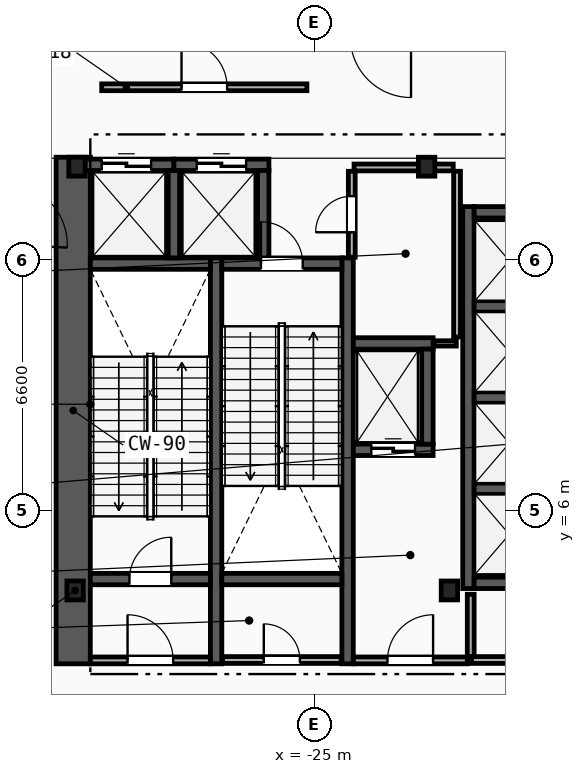
"""IFC4 building model, lengths in metres.
Left out: names, types, materials, properties, quantities, classifications, styles, units other than length and angle.
Written with IfcOpenShell. Run it as: python <this file> out.ifc"""

import sys

from ifc_helpers import new_model, si_unit, direction, frame, frame_2d, origin, origin_2d, place, context, subcontext, project, spatial, rectangle, i_section, extrude, element, fill, save


model = new_model("IFC4")
c1 = context("Model", 3, precision=1e-05, world=origin(), true_north=direction((0.0, 1.0)))
c2 = subcontext(c1, "Body", "Model", "MODEL_VIEW")
j1 = project(units=[si_unit("LENGTHUNIT", "METRE"), si_unit("PLANEANGLEUNIT", "RADIAN")], contexts=[c1])
p1 = place(None, origin())
s1 = spatial("IfcSite", under=j1, at=p1, CompositionType="ELEMENT")
p2 = place(p1, origin())
s2 = spatial("IfcBuilding", under=s1, at=p2, CompositionType="ELEMENT")
p3 = place(p2, origin())
s3 = spatial("IfcBuildingStorey", under=s2, at=p3, CompositionType="ELEMENT", Elevation=0.0)
for number, where, z_axis, x_axis in (
    (1, (-31.3, 3.9, 0.0), (0.0, 0.0, 1.0), (1.0, 0.0, 0.0)),
    (2, (-21.45, 3.9, 0.0), (0.0, 0.0, 1.0), (1.0, 0.0, 0.0)),
    (3, (-22.05, 15.05, 0.0), (0.0, 0.0, 1.0), (1.0, 0.0, 0.0)),
    (4, (-31.25, 15.05, 0.0), (0.0, 0.0, 1.0), (1.0, 0.0, 0.0)),
):
    element("IfcColumn", number, at=place(p3, frame(where, z_axis=z_axis, x_axis=x_axis)), inside=s3, PredefinedType="COLUMN", context=c2, shape_type="SweptSolid", body=[
        extrude(i_section(OverallWidth=0.432, OverallDepth=0.498, WebThickness=0.056, FlangeThickness=0.089, FilletRadius=0.018, at=origin_2d()), origin(), (0.0, 0.0, 1.0), 6.0),
    ])
p4 = place(p3, frame((-31.35, 1.97, 0.0), z_axis=(0.0, 0.0, 1.0), x_axis=(0.0, 1.0, 0.0)))
e5 = element("IfcWall", 5, at=p4, inside=s3, PredefinedType="SHEAR", context=c2, shape_type="SweptSolid", body=[
    extrude(rectangle(XDim=13.33, YDim=0.9, at=frame_2d((6.665, 0.0))), origin(), (0.0, 0.0, 1.0), 5.65),
])
for number, where, z_axis, x_axis in (
    (6, (-27.59, 1.97, 0.0), (0.0, 0.0, 1.0), (0.0, 1.0, 0.0)),
    (7, (-24.13, 1.97, 0.0), (0.0, 0.0, 1.0), (0.0, 1.0, 0.0)),
):
    element("IfcWall", number, at=place(p3, frame(where, z_axis=z_axis, x_axis=x_axis)), inside=s3, PredefinedType="SHEAR", context=c2, shape_type="SweptSolid", body=[
        extrude(rectangle(XDim=10.68, YDim=0.3, at=frame_2d((5.34, 0.0))), origin(), (0.0, 0.0, 1.0), 5.65),
    ])
p5 = place(p3, frame((-30.9, 4.2, 0.0), z_axis=(0.0, 0.0, 1.0), x_axis=(1.0, 0.0, 0.0)))
e8 = element("IfcWall", 8, at=p5, inside=s3, PredefinedType="SHEAR", context=c2, shape_type="SweptSolid", body=[
    extrude(rectangle(XDim=3.16, YDim=0.3, at=frame_2d((1.58, 0.0))), origin(), (0.0, 0.0, 1.0), 5.65),
])
p6 = place(p5, frame((1.03, 0.0, 0.0)))
e9 = element("IfcOpeningElement", 9, at=p6, cuts=e8, PredefinedType="OPENING", context=c2, shape_type="SweptSolid", body=[
    extrude(rectangle(XDim=1.1, YDim=2.15, at=frame_2d((0.55, 1.075))), frame((0.0, 0.16, 0.0), z_axis=(0.0, -1.0, 0.0), x_axis=(1.0, 0.0, 0.0)), (0.0, 0.0, 1.0), 0.32),
])
p7 = place(p3, frame((-30.9, 12.5, 0.0), z_axis=(0.0, 0.0, 1.0), x_axis=(1.0, 0.0, 0.0)))
e10 = element("IfcWall", 10, at=p7, inside=s3, PredefinedType="SHEAR", context=c2, shape_type="SweptSolid", body=[
    extrude(rectangle(XDim=3.16, YDim=0.3, at=frame_2d((1.58, 0.0))), origin(), (0.0, 0.0, 1.0), 5.65),
])
p8 = place(p3, frame((-27.44, 12.5, 0.0), z_axis=(0.0, 0.0, 1.0), x_axis=(1.0, 0.0, 0.0)))
e11 = element("IfcWall", 11, at=p8, inside=s3, PredefinedType="SHEAR", context=c2, shape_type="SweptSolid", body=[
    extrude(rectangle(XDim=3.16, YDim=0.3, at=frame_2d((1.58, 0.0))), origin(), (0.0, 0.0, 1.0), 5.65),
])
p9 = place(p8, frame((1.03, 0.0, 0.0)))
e12 = element("IfcOpeningElement", 12, at=p9, cuts=e11, PredefinedType="OPENING", context=c2, shape_type="SweptSolid", body=[
    extrude(rectangle(XDim=1.1, YDim=2.15, at=frame_2d((0.55, 1.075))), frame((0.0, 0.16, 0.0), z_axis=(0.0, -1.0, 0.0), x_axis=(1.0, 0.0, 0.0)), (0.0, 0.0, 1.0), 0.32),
])
p10 = place(p3, frame((-27.44, 4.2, 0.0), z_axis=(0.0, 0.0, 1.0), x_axis=(1.0, 0.0, 0.0)))
e13 = element("IfcWall", 13, at=p10, inside=s3, PredefinedType="SHEAR", context=c2, shape_type="SweptSolid", body=[
    extrude(rectangle(XDim=3.16, YDim=0.3, at=frame_2d((1.58, 0.0))), origin(), (0.0, 0.0, 1.0), 5.65),
])
p11 = place(p3, frame((-20.89, 2.15, 0.0), z_axis=(0.0, 0.0, 1.0), x_axis=(0.0, 1.0, 0.0)))
e14 = element("IfcWall", 14, at=p11, inside=s3, PredefinedType="PARTITIONING", context=c2, shape_type="SweptSolid", body=[
    extrude(rectangle(XDim=1.65, YDim=0.18, at=frame_2d((0.825, 0.0))), origin(), (0.0, 0.0, 1.0), 5.65),
])
p12 = place(p3, frame((-23.98, 2.06, 0.0), z_axis=(0.0, 0.0, 1.0), x_axis=(1.0, 0.0, 0.0)))
e15 = element("IfcWall", 15, at=p12, inside=s3, PredefinedType="PARTITIONING", context=c2, shape_type="SweptSolid", body=[
    extrude(rectangle(XDim=3.0, YDim=0.18, at=frame_2d((1.5, 0.0))), origin(), (0.0, 0.0, 1.0), 5.65),
])
p13 = place(p12, frame((0.9, 0.0, 0.0)))
e16 = element("IfcOpeningElement", 16, at=p13, cuts=e15, PredefinedType="OPENING", context=c2, shape_type="SweptSolid", body=[
    extrude(rectangle(XDim=1.2, YDim=2.15, at=frame_2d((0.6, 1.075))), frame((0.0, 0.1, 0.0), z_axis=(0.0, -1.0, 0.0), x_axis=(1.0, 0.0, 0.0)), (0.0, 0.0, 1.0), 0.2),
])
p14 = place(p3, frame((-30.9, 2.06, 0.0), z_axis=(0.0, 0.0, 1.0), x_axis=(1.0, 0.0, 0.0)))
e17 = element("IfcWall", 17, at=p14, inside=s3, PredefinedType="PARTITIONING", context=c2, shape_type="SweptSolid", body=[
    extrude(rectangle(XDim=3.16, YDim=0.18, at=frame_2d((1.58, 0.0))), origin(), (0.0, 0.0, 1.0), 5.65),
])
p15 = place(p14, frame((0.98, 0.0, 0.0)))
e18 = element("IfcOpeningElement", 18, at=p15, cuts=e17, PredefinedType="OPENING", context=c2, shape_type="SweptSolid", body=[
    extrude(rectangle(XDim=1.2, YDim=2.15, at=frame_2d((0.6, 1.075))), frame((0.0, 0.1, 0.0), z_axis=(0.0, -1.0, 0.0), x_axis=(1.0, 0.0, 0.0)), (0.0, 0.0, 1.0), 0.2),
])
p16 = place(p3, frame((-30.6, 17.14, 0.0), z_axis=(0.0, 0.0, 1.0), x_axis=(1.0, 0.0, 0.0)))
e19 = element("IfcWall", 19, at=p16, inside=s3, PredefinedType="PARTITIONING", context=c2, shape_type="SweptSolid", body=[
    extrude(rectangle(XDim=5.4, YDim=0.18, at=frame_2d((2.7, 0.0))), origin(), (0.0, 0.0, 1.0), 5.65),
])
p17 = place(p16, frame((2.1, 0.0, 0.0)))
e20 = element("IfcOpeningElement", 20, at=p17, cuts=e19, PredefinedType="OPENING", context=c2, shape_type="SweptSolid", body=[
    extrude(rectangle(XDim=1.2, YDim=2.15, at=frame_2d((0.6, 1.075))), frame((0.0, 0.1, 0.0), z_axis=(0.0, -1.0, 0.0), x_axis=(1.0, 0.0, 0.0)), (0.0, 0.0, 1.0), 0.2),
])
p18 = place(p3, frame((-23.98, 7.6, 0.0), z_axis=(0.0, 0.0, 1.0), x_axis=(1.0, 0.0, 0.0)))
e21 = element("IfcWall", 21, at=p18, inside=s3, PredefinedType="SHEAR", context=c2, shape_type="SweptSolid", body=[
    extrude(rectangle(XDim=2.1, YDim=0.3, at=frame_2d((1.05, 0.0))), origin(), (0.0, 0.0, 1.0), 5.65),
])
p19 = place(p18, frame((0.475, 0.0, 0.0)))
e22 = element("IfcOpeningElement", 22, at=p19, cuts=e21, PredefinedType="OPENING", context=c2, shape_type="SweptSolid", body=[
    extrude(rectangle(XDim=1.15, YDim=2.2, at=frame_2d((0.575, 1.1))), frame((0.0, 0.16, 0.0), z_axis=(0.0, -1.0, 0.0), x_axis=(1.0, 0.0, 0.0)), (0.0, 0.0, 1.0), 0.32),
])
p20 = place(p3, frame((-23.98, 10.4, 0.0), z_axis=(0.0, 0.0, 1.0), x_axis=(1.0, 0.0, 0.0)))
e23 = element("IfcWall", 23, at=p20, inside=s3, PredefinedType="SHEAR", context=c2, shape_type="SweptSolid", body=[
    extrude(rectangle(XDim=2.1, YDim=0.3, at=frame_2d((1.05, 0.0))), origin(), (0.0, 0.0, 1.0), 5.65),
])
p21 = place(p3, frame((-22.03, 7.75, 0.0), z_axis=(0.0, 0.0, 1.0), x_axis=(0.0, 1.0, 0.0)))
e24 = element("IfcWall", 24, at=p21, inside=s3, PredefinedType="SHEAR", context=c2, shape_type="SweptSolid", body=[
    extrude(rectangle(XDim=2.5, YDim=0.3, at=frame_2d((1.25, 0.0))), origin(), (0.0, 0.0, 1.0), 5.65),
])
p22 = place(p3, frame((-31.2, 15.1, 0.0), z_axis=(0.0, 0.0, 1.0), x_axis=(1.0, 0.0, 0.0)))
e25 = element("IfcWall", 25, at=p22, inside=s3, PredefinedType="SHEAR", context=c2, shape_type="SweptSolid", body=[
    extrude(rectangle(XDim=2.5, YDim=0.3, at=frame_2d((1.25, 0.0))), origin(), (0.0, 0.0, 1.0), 5.65),
])
p23 = place(p22, frame((0.6, 0.0, 0.0)))
e26 = element("IfcOpeningElement", 26, at=p23, cuts=e25, PredefinedType="OPENING", context=c2, shape_type="SweptSolid", body=[
    extrude(rectangle(XDim=1.3, YDim=2.2, at=frame_2d((0.65, 1.1))), frame((0.0, 0.16, 0.0), z_axis=(0.0, -1.0, 0.0), x_axis=(1.0, 0.0, 0.0)), (0.0, 0.0, 1.0), 0.32),
])
p24 = place(p3, frame((-28.7, 12.65, 0.0), z_axis=(0.0, 0.0, 1.0), x_axis=(0.0, 1.0, 0.0)))
e27 = element("IfcWall", 27, at=p24, inside=s3, PredefinedType="SHEAR", context=c2, shape_type="SweptSolid", body=[
    extrude(rectangle(XDim=2.3, YDim=0.3, at=frame_2d((1.15, 0.0))), origin(), (0.0, 0.0, 1.0), 5.65),
])
p25 = place(p3, frame((-28.7, 15.1, 0.0), z_axis=(0.0, 0.0, 1.0), x_axis=(1.0, 0.0, 0.0)))
e28 = element("IfcWall", 28, at=p25, inside=s3, PredefinedType="SHEAR", context=c2, shape_type="SweptSolid", body=[
    extrude(rectangle(XDim=2.5, YDim=0.3, at=frame_2d((1.25, 0.0))), origin(), (0.0, 0.0, 1.0), 5.65),
])
p26 = place(p25, frame((0.6, 0.0, 0.0)))
e29 = element("IfcOpeningElement", 29, at=p26, cuts=e28, PredefinedType="OPENING", context=c2, shape_type="SweptSolid", body=[
    extrude(rectangle(XDim=1.3, YDim=2.2, at=frame_2d((0.65, 1.1))), frame((0.0, 0.16, 0.0), z_axis=(0.0, -1.0, 0.0), x_axis=(1.0, 0.0, 0.0)), (0.0, 0.0, 1.0), 0.32),
])
p27 = place(p3, frame((-26.35, 12.65, 0.0), z_axis=(0.0, 0.0, 1.0), x_axis=(0.0, 1.0, 0.0)))
e30 = element("IfcWall", 30, at=p27, inside=s3, PredefinedType="SHEAR", context=c2, shape_type="SweptSolid", body=[
    extrude(rectangle(XDim=2.3, YDim=0.3, at=frame_2d((1.15, 0.0))), origin(), (0.0, 0.0, 1.0), 5.65),
])
p28 = place(p3, frame((-20.95, 3.95, 0.0), z_axis=(0.0, 0.0, 1.0), x_axis=(0.0, 1.0, 0.0)))
e31 = element("IfcWall", 31, at=p28, inside=s3, PredefinedType="SHEAR", context=c2, shape_type="SweptSolid", body=[
    extrude(rectangle(XDim=10.05, YDim=0.3, at=frame_2d((5.025, 0.0))), origin(), (0.0, 0.0, 1.0), 5.65),
])
for number, where, z_axis, x_axis in (
    (32, (-20.8, 4.1, 0.0), (0.0, 0.0, 1.0), (1.0, 0.0, 0.0)),
    (33, (-20.8, 13.85, 0.0), (0.0, 0.0, 1.0), (1.0, 0.0, 0.0)),
):
    element("IfcWall", number, at=place(p3, frame(where, z_axis=z_axis, x_axis=x_axis)), inside=s3, PredefinedType="SHEAR", context=c2, shape_type="SweptSolid", body=[
        extrude(rectangle(XDim=2.15, YDim=0.3, at=frame_2d((1.075, 0.0))), origin(), (0.0, 0.0, 1.0), 5.65),
    ])
for number, where, z_axis, x_axis in (
    (34, (-20.8, 6.575, 0.0), (0.0, 0.0, 1.0), (1.0, 0.0, 0.0)),
    (35, (-20.8, 8.975, 0.0), (0.0, 0.0, 1.0), (1.0, 0.0, 0.0)),
    (36, (-20.8, 11.375, 0.0), (0.0, 0.0, 1.0), (1.0, 0.0, 0.0)),
):
    element("IfcWall", number, at=place(p3, frame(where, z_axis=z_axis, x_axis=x_axis)), inside=s3, PredefinedType="SHEAR", context=c2, shape_type="SweptSolid", body=[
        extrude(rectangle(XDim=1.85, YDim=0.3, at=frame_2d((0.925, 0.0))), origin(), (0.0, 0.0, 1.0), 5.65),
    ])
p29 = place(p3, frame((-20.87, 2.07, 0.0), z_axis=(0.0, 0.0, 1.0), x_axis=(1.0, 0.0, 0.0)))
e37 = element("IfcWall", 37, at=p29, inside=s3, PredefinedType="PARTITIONING", context=c2, shape_type="SweptSolid", body=[
    extrude(rectangle(XDim=3.83, YDim=0.18, at=frame_2d((1.915, 0.0))), origin(), (0.0, 0.0, 1.0), 5.65),
])
p30 = place(p29, frame((1.44, 0.0, 0.0)))
e38 = element("IfcOpeningElement", 38, at=p30, cuts=e37, PredefinedType="OPENING", context=c2, shape_type="SweptSolid", body=[
    extrude(rectangle(XDim=0.95, YDim=2.1, at=frame_2d((0.475, 1.05))), frame((0.0, 0.1, 0.0), z_axis=(0.0, -1.0, 0.0), x_axis=(1.0, 0.0, 0.0)), (0.0, 0.0, 1.0), 0.2),
])
p31 = place(p3, frame((-21.86, 10.4, 0.0), z_axis=(0.0, 0.0, 1.0), x_axis=(1.0, 0.0, 0.0)))
e39 = element("IfcWall", 39, at=p31, inside=s3, PredefinedType="PARTITIONING", context=c2, shape_type="SweptSolid", body=[
    extrude(rectangle(XDim=0.59, YDim=0.14, at=frame_2d((0.295, 0.0))), origin(), (0.0, 0.0, 1.0), 5.65),
])
p32 = place(p3, frame((-21.25, 10.57, 0.0), z_axis=(0.0, 0.0, 1.0), x_axis=(0.0, 1.0, 0.0)))
e40 = element("IfcWall", 40, at=p32, inside=s3, PredefinedType="PARTITIONING", context=c2, shape_type="SweptSolid", body=[
    extrude(rectangle(XDim=4.36, YDim=0.18, at=frame_2d((2.18, 0.0))), origin(), (0.0, 0.0, 1.0), 5.65),
])
p33 = place(p3, frame((-23.96, 15.03, 0.0), z_axis=(0.0, 0.0, 1.0), x_axis=(1.0, 0.0, 0.0)))
e41 = element("IfcWall", 41, at=p33, inside=s3, PredefinedType="PARTITIONING", context=c2, shape_type="SweptSolid", body=[
    extrude(rectangle(XDim=2.61, YDim=0.18, at=frame_2d((1.305, 0.0))), origin(), (0.0, 0.0, 1.0), 4.723),
])
p34 = place(p3, frame((-27.42, 2.07, 0.0), z_axis=(0.0, 0.0, 1.0), x_axis=(1.0, 0.0, 0.0)))
e42 = element("IfcWall", 42, at=p34, inside=s3, PredefinedType="PARTITIONING", context=c2, shape_type="SweptSolid", body=[
    extrude(rectangle(XDim=3.12, YDim=0.18, at=frame_2d((1.56, 0.0))), origin(), (0.0, 0.0, 1.0), 5.65),
])
p35 = place(p34, frame((1.085, 0.0, 0.0)))
e43 = element("IfcOpeningElement", 43, at=p35, cuts=e42, PredefinedType="OPENING", context=c2, shape_type="SweptSolid", body=[
    extrude(rectangle(XDim=0.95, YDim=2.1, at=frame_2d((0.475, 1.05))), frame((0.0, 0.1, 0.0), z_axis=(0.0, -1.0, 0.0), x_axis=(1.0, 0.0, 0.0)), (0.0, 0.0, 1.0), 0.2),
])
p36 = place(p3, frame((-24.02, 12.67, 0.0), z_axis=(0.0, 0.0, 1.0), x_axis=(0.0, 1.0, 0.0)))
e44 = element("IfcWall", 44, at=p36, inside=s3, PredefinedType="PARTITIONING", context=c2, shape_type="SweptSolid", body=[
    extrude(rectangle(XDim=2.26, YDim=0.18, at=frame_2d((1.13, 0.0))), origin(), (0.0, 0.0, 1.0), 5.65),
])
p37 = place(p36, frame((0.655, 0.0, 0.0)))
e45 = element("IfcOpeningElement", 45, at=p37, cuts=e44, PredefinedType="OPENING", context=c2, shape_type="SweptSolid", body=[
    extrude(rectangle(XDim=0.95, YDim=2.1, at=frame_2d((0.475, 1.05))), frame((0.0, 0.1, 0.0), z_axis=(0.0, -1.0, 0.0), x_axis=(1.0, 0.0, 0.0)), (0.0, 0.0, 1.0), 0.2),
])
p38 = place(p6, origin())
e46 = element("IfcDoor", 46, at=p38, inside=s3, OperationType="SINGLE_SWING_RIGHT", PredefinedType="DOOR", context=c2, shape_type="SweptSolid", body=[
    extrude(rectangle(XDim=1.1, YDim=2.15, at=frame_2d((0.55, 1.075))), frame((0.0, 0.025, 0.0), z_axis=(0.0, -1.0, 0.0), x_axis=(1.0, 0.0, 0.0)), (0.0, 0.0, 1.0), 0.05),
])
fill(e9, e46)
p39 = place(p9, origin())
e47 = element("IfcDoor", 47, at=p39, inside=s3, OperationType="SINGLE_SWING_LEFT", PredefinedType="DOOR", context=c2, shape_type="SweptSolid", body=[
    extrude(rectangle(XDim=1.1, YDim=2.15, at=frame_2d((0.55, 1.075))), frame((0.0, 0.025, 0.0), z_axis=(0.0, -1.0, 0.0), x_axis=(1.0, 0.0, 0.0)), (0.0, 0.0, 1.0), 0.05),
])
fill(e12, e47)
p40 = place(p13, origin())
e48 = element("IfcDoor", 48, at=p40, inside=s3, OperationType="SINGLE_SWING_RIGHT", PredefinedType="DOOR", context=c2, shape_type="SweptSolid", body=[
    extrude(rectangle(XDim=1.2, YDim=2.15, at=frame_2d((0.6, 1.075))), frame((0.0, 0.025, 0.0), z_axis=(0.0, -1.0, 0.0), x_axis=(1.0, 0.0, 0.0)), (0.0, 0.0, 1.0), 0.05),
])
fill(e16, e48)
p41 = place(p15, origin())
e49 = element("IfcDoor", 49, at=p41, inside=s3, OperationType="SINGLE_SWING_LEFT", PredefinedType="DOOR", context=c2, shape_type="SweptSolid", body=[
    extrude(rectangle(XDim=1.2, YDim=2.15, at=frame_2d((0.6, 1.075))), frame((0.0, 0.025, 0.0), z_axis=(0.0, -1.0, 0.0), x_axis=(1.0, 0.0, 0.0)), (0.0, 0.0, 1.0), 0.05),
])
fill(e18, e49)
p42 = place(p17, origin())
e50 = element("IfcDoor", 50, at=p42, inside=s3, OperationType="SINGLE_SWING_LEFT", PredefinedType="DOOR", context=c2, shape_type="SweptSolid", body=[
    extrude(rectangle(XDim=1.2, YDim=2.15, at=frame_2d((0.6, 1.075))), frame((0.0, 0.025, 0.0), z_axis=(0.0, -1.0, 0.0), x_axis=(1.0, 0.0, 0.0)), (0.0, 0.0, 1.0), 0.05),
])
fill(e20, e50)
p43 = place(p19, origin())
e51 = element("IfcDoor", 51, at=p43, inside=s3, OperationType="SLIDING_TO_LEFT", PredefinedType="TRAPDOOR", context=c2, shape_type="SweptSolid", body=[
    extrude(rectangle(XDim=1.15, YDim=2.2, at=frame_2d((0.575, 1.1))), frame((0.0, 0.025, 0.0), z_axis=(0.0, -1.0, 0.0), x_axis=(1.0, 0.0, 0.0)), (0.0, 0.0, 1.0), 0.05),
])
fill(e22, e51)
p44 = place(p23, origin())
e52 = element("IfcDoor", 52, at=p44, inside=s3, OperationType="SLIDING_TO_LEFT", PredefinedType="TRAPDOOR", context=c2, shape_type="SweptSolid", body=[
    extrude(rectangle(XDim=1.3, YDim=2.2, at=frame_2d((0.65, 1.1))), frame((0.0, 0.025, 0.0), z_axis=(0.0, -1.0, 0.0), x_axis=(1.0, 0.0, 0.0)), (0.0, 0.0, 1.0), 0.05),
])
fill(e26, e52)
p45 = place(p26, origin())
e53 = element("IfcDoor", 53, at=p45, inside=s3, OperationType="SLIDING_TO_LEFT", PredefinedType="TRAPDOOR", context=c2, shape_type="SweptSolid", body=[
    extrude(rectangle(XDim=1.3, YDim=2.2, at=frame_2d((0.65, 1.1))), frame((0.0, 0.025, 0.0), z_axis=(0.0, -1.0, 0.0), x_axis=(1.0, 0.0, 0.0)), (0.0, 0.0, 1.0), 0.05),
])
fill(e29, e53)
p46 = place(p35, origin())
e54 = element("IfcDoor", 54, at=p46, inside=s3, OperationType="SINGLE_SWING_LEFT", PredefinedType="DOOR", context=c2, shape_type="SweptSolid", body=[
    extrude(rectangle(XDim=0.95, YDim=2.1, at=frame_2d((0.475, 1.05))), frame((0.0, 0.025, 0.0), z_axis=(0.0, -1.0, 0.0), x_axis=(1.0, 0.0, 0.0)), (0.0, 0.0, 1.0), 0.05),
])
fill(e43, e54)
p47 = place(p37, origin())
e55 = element("IfcDoor", 55, at=p47, inside=s3, OperationType="SINGLE_SWING_LEFT", PredefinedType="DOOR", context=c2, shape_type="SweptSolid", body=[
    extrude(rectangle(XDim=0.95, YDim=2.1, at=frame_2d((0.475, 1.05))), frame((0.0, 0.025, 0.0), z_axis=(0.0, -1.0, 0.0), x_axis=(1.0, 0.0, 0.0)), (0.0, 0.0, 1.0), 0.05),
])
fill(e45, e55)
save(model, sys.argv[1])
